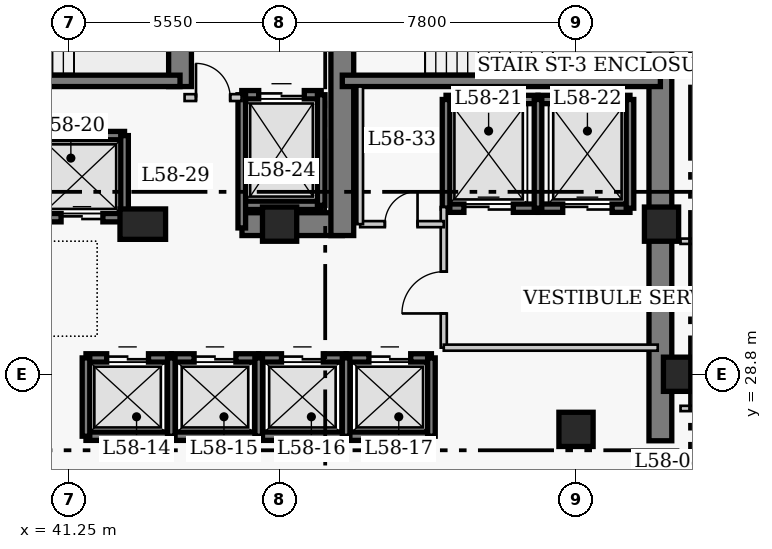
"""IFC4 building model, lengths in metres.
Left out: names, types, materials, properties, quantities, classifications, styles, units other than length and angle.
Written with IfcOpenShell. Run it as: python <this file> out.ifc"""

import sys

from ifc_helpers import new_model, si_unit, direction, frame, frame_2d, origin, origin_2d, place, context, subcontext, project, spatial, rectangle, extrude, element, fill, save


model = new_model("IFC4")
c1 = context("Model", 3, precision=1e-05, world=origin(), true_north=direction((0.0, 1.0)))
c2 = subcontext(c1, "Body", "Model", "MODEL_VIEW")
j1 = project(units=[si_unit("LENGTHUNIT", "METRE"), si_unit("PLANEANGLEUNIT", "RADIAN")], contexts=[c1])
p1 = place(None, origin())
s1 = spatial("IfcSite", under=j1, at=p1, CompositionType="ELEMENT")
p2 = place(p1, origin())
s2 = spatial("IfcBuilding", under=s1, at=p2, CompositionType="ELEMENT")
p3 = place(p2, frame((0.0, 0.0, 231.9)))
s3 = spatial("IfcBuildingStorey", under=s2, at=p3, CompositionType="ELEMENT", Elevation=231.9)
p4 = place(p3, frame((56.82, 27.05, 0.0), z_axis=(0.0, 0.0, 1.0), x_axis=(0.0, 1.0, 0.0)))
e1 = element("IfcWall", 1, at=p4, inside=s3, PredefinedType="SHEAR", context=c2, shape_type="SweptSolid", body=[
    extrude(rectangle(XDim=13.57, YDim=0.6, at=frame_2d((6.785, 0.0))), origin(), (0.0, 0.0, 1.0), 4.6),
])
p5 = place(p3, frame((45.81, 32.75, 0.0), z_axis=(0.0, 0.0, 1.0), x_axis=(1.0, 0.0, 0.0)))
e2 = element("IfcWall", 2, at=p5, inside=s3, PredefinedType="SHEAR", context=c2, shape_type="SweptSolid", body=[
    extrude(rectangle(XDim=2.64, YDim=0.6, at=frame_2d((1.32, 0.0))), origin(), (0.0, 0.0, 1.0), 4.6),
])
p6 = place(p3, frame((44.18, 36.37, 0.0), z_axis=(0.0, 0.0, 1.0), x_axis=(0.0, 1.0, 0.0)))
e3 = element("IfcWall", 3, at=p6, inside=s3, PredefinedType="SHEAR", context=c2, shape_type="SweptSolid", body=[
    extrude(rectangle(XDim=3.95, YDim=0.6, at=frame_2d((1.975, 0.0))), origin(), (0.0, 0.0, 1.0), 4.6),
])
p7 = place(p3, frame((48.45, 32.45, 0.0), z_axis=(0.0, 0.0, 1.0), x_axis=(0.0, 1.0, 0.0)))
e4 = element("IfcWall", 4, at=p7, inside=s3, PredefinedType="SHEAR", context=c2, shape_type="SweptSolid", body=[
    extrude(rectangle(XDim=7.87, YDim=0.6, at=frame_2d((3.935, 0.0))), origin(), (0.0, 0.0, 1.0), 4.6),
])
p8 = place(p7, frame((5.75, 0.0, 0.0)))
e5 = element("IfcOpeningElement", 5, at=p8, cuts=e4, PredefinedType="OPENING", context=c2, shape_type="SweptSolid", body=[
    extrude(rectangle(XDim=1.1, YDim=2.15, at=frame_2d((0.55, 1.075))), frame((0.0, 0.31, 0.0), z_axis=(0.0, -1.0, 0.0), x_axis=(1.0, 0.0, 0.0)), (0.0, 0.0, 1.0), 0.62),
])
p9 = place(p3, frame((35.85, 36.52, 0.0), z_axis=(0.0, 0.0, 1.0), x_axis=(1.0, 0.0, 0.0)))
e6 = element("IfcWall", 6, at=p9, inside=s3, PredefinedType="SHEAR", context=c2, shape_type="SweptSolid", body=[
    extrude(rectangle(XDim=8.33, YDim=0.3, at=frame_2d((4.165, 0.0))), origin(), (0.0, 0.0, 1.0), 4.6),
])
p10 = place(p3, frame((48.45, 36.52, 0.0), z_axis=(0.0, 0.0, 1.0), x_axis=(1.0, 0.0, 0.0)))
e7 = element("IfcWall", 7, at=p10, inside=s3, PredefinedType="SHEAR", context=c2, shape_type="SweptSolid", body=[
    extrude(rectangle(XDim=8.37, YDim=0.3, at=frame_2d((4.185, 0.0))), origin(), (0.0, 0.0, 1.0), 4.6),
])
p11 = place(p3, frame((57.35, 28.8, 0.0), z_axis=(0.0, 0.0, 1.0), x_axis=(1.0, 0.0, 0.0)))
e8 = element("IfcColumn", 8, at=p11, inside=s3, PredefinedType="COLUMN", context=c2, shape_type="SweptSolid", body=[
    extrude(rectangle(XDim=0.9, YDim=0.9, at=origin_2d()), origin(), (0.0, 0.0, 1.0), 4.6),
])
p12 = place(p3, frame((43.2, 32.75, 0.0), z_axis=(0.0, 0.0, 1.0), x_axis=(1.0, 0.0, 0.0)))
e9 = element("IfcColumn", 9, at=p12, inside=s3, PredefinedType="COLUMN", context=c2, shape_type="SweptSolid", body=[
    extrude(rectangle(XDim=1.2, YDim=0.8, at=origin_2d()), origin(), (0.0, 0.0, 1.0), 4.6),
])
for number, where, z_axis, x_axis in (
    (10, (46.8, 32.75, 0.0), (0.0, 0.0, 1.0), (1.0, 0.0, 0.0)),
    (11, (54.6, 27.35, 0.0), (0.0, 0.0, 1.0), (1.0, 0.0, 0.0)),
    (12, (56.85, 32.75, 0.0), (0.0, 0.0, 1.0), (1.0, 0.0, 0.0)),
):
    element("IfcColumn", number, at=place(p3, frame(where, z_axis=z_axis, x_axis=x_axis)), inside=s3, PredefinedType="COLUMN", context=c2, shape_type="SweptSolid", body=[
        extrude(rectangle(XDim=0.9, YDim=0.9, at=origin_2d()), origin(), (0.0, 0.0, 1.0), 4.6),
    ])
p13 = place(p3, frame((41.705, 29.23, 0.0), z_axis=(0.0, 0.0, 1.0), x_axis=(1.0, 0.0, 0.0)))
e13 = element("IfcWall", 13, at=p13, inside=s3, PredefinedType="SHEAR", context=c2, shape_type="SweptSolid", body=[
    extrude(rectangle(XDim=2.245, YDim=0.22, at=frame_2d((1.123, 0.0))), origin(), (0.0, 0.0, 1.0), 4.6),
])
p14 = place(p13, frame((0.545, 0.0, 0.0)))
e14 = element("IfcOpeningElement", 14, at=p14, cuts=e13, PredefinedType="OPENING", context=c2, shape_type="SweptSolid", body=[
    extrude(rectangle(XDim=1.1, YDim=2.15, at=frame_2d((0.55, 1.075))), frame((0.0, 0.12, 0.0), z_axis=(0.0, -1.0, 0.0), x_axis=(1.0, 0.0, 0.0)), (0.0, 0.0, 1.0), 0.24),
])
p15 = place(p3, frame((41.705, 27.17, 0.0), z_axis=(0.0, 0.0, 1.0), x_axis=(1.0, 0.0, 0.0)))
e15 = element("IfcWall", 15, at=p15, inside=s3, PredefinedType="SHEAR", context=c2, shape_type="SweptSolid", body=[
    extrude(rectangle(XDim=2.245, YDim=0.22, at=frame_2d((1.123, 0.0))), origin(), (0.0, 0.0, 1.0), 4.6),
])
p16 = place(p3, frame((41.705, 27.17, 0.0), z_axis=(0.0, 0.0, 1.0), x_axis=(0.0, 1.0, 0.0)))
e16 = element("IfcWall", 16, at=p16, inside=s3, PredefinedType="SHEAR", context=c2, shape_type="SweptSolid", body=[
    extrude(rectangle(XDim=2.06, YDim=0.2, at=frame_2d((1.03, 0.0))), origin(), (0.0, 0.0, 1.0), 4.6),
])
p17 = place(p3, frame((43.95, 29.23, 0.0), z_axis=(0.0, 0.0, 1.0), x_axis=(1.0, 0.0, 0.0)))
e17 = element("IfcWall", 17, at=p17, inside=s3, PredefinedType="SHEAR", context=c2, shape_type="SweptSolid", body=[
    extrude(rectangle(XDim=2.3, YDim=0.22, at=frame_2d((1.15, 0.0))), origin(), (0.0, 0.0, 1.0), 4.6),
])
p18 = place(p17, frame((0.6, 0.0, 0.0)))
e18 = element("IfcOpeningElement", 18, at=p18, cuts=e17, PredefinedType="OPENING", context=c2, shape_type="SweptSolid", body=[
    extrude(rectangle(XDim=1.1, YDim=2.15, at=frame_2d((0.55, 1.075))), frame((0.0, 0.12, 0.0), z_axis=(0.0, -1.0, 0.0), x_axis=(1.0, 0.0, 0.0)), (0.0, 0.0, 1.0), 0.24),
])
p19 = place(p3, frame((43.95, 27.17, 0.0), z_axis=(0.0, 0.0, 1.0), x_axis=(1.0, 0.0, 0.0)))
e19 = element("IfcWall", 19, at=p19, inside=s3, PredefinedType="SHEAR", context=c2, shape_type="SweptSolid", body=[
    extrude(rectangle(XDim=2.3, YDim=0.22, at=frame_2d((1.15, 0.0))), origin(), (0.0, 0.0, 1.0), 4.6),
])
p20 = place(p3, frame((43.95, 27.17, 0.0), z_axis=(0.0, 0.0, 1.0), x_axis=(0.0, 1.0, 0.0)))
e20 = element("IfcWall", 20, at=p20, inside=s3, PredefinedType="SHEAR", context=c2, shape_type="SweptSolid", body=[
    extrude(rectangle(XDim=2.06, YDim=0.2, at=frame_2d((1.03, 0.0))), origin(), (0.0, 0.0, 1.0), 4.6),
])
p21 = place(p3, frame((46.25, 29.23, 0.0), z_axis=(0.0, 0.0, 1.0), x_axis=(1.0, 0.0, 0.0)))
e21 = element("IfcWall", 21, at=p21, inside=s3, PredefinedType="SHEAR", context=c2, shape_type="SweptSolid", body=[
    extrude(rectangle(XDim=2.3, YDim=0.22, at=frame_2d((1.15, 0.0))), origin(), (0.0, 0.0, 1.0), 4.6),
])
p22 = place(p21, frame((0.6, 0.0, 0.0)))
e22 = element("IfcOpeningElement", 22, at=p22, cuts=e21, PredefinedType="OPENING", context=c2, shape_type="SweptSolid", body=[
    extrude(rectangle(XDim=1.1, YDim=2.15, at=frame_2d((0.55, 1.075))), frame((0.0, 0.12, 0.0), z_axis=(0.0, -1.0, 0.0), x_axis=(1.0, 0.0, 0.0)), (0.0, 0.0, 1.0), 0.24),
])
p23 = place(p3, frame((46.25, 27.17, 0.0), z_axis=(0.0, 0.0, 1.0), x_axis=(1.0, 0.0, 0.0)))
e23 = element("IfcWall", 23, at=p23, inside=s3, PredefinedType="SHEAR", context=c2, shape_type="SweptSolid", body=[
    extrude(rectangle(XDim=2.3, YDim=0.22, at=frame_2d((1.15, 0.0))), origin(), (0.0, 0.0, 1.0), 4.6),
])
p24 = place(p3, frame((46.25, 27.17, 0.0), z_axis=(0.0, 0.0, 1.0), x_axis=(0.0, 1.0, 0.0)))
e24 = element("IfcWall", 24, at=p24, inside=s3, PredefinedType="SHEAR", context=c2, shape_type="SweptSolid", body=[
    extrude(rectangle(XDim=2.06, YDim=0.2, at=frame_2d((1.03, 0.0))), origin(), (0.0, 0.0, 1.0), 4.6),
])
p25 = place(p3, frame((48.55, 29.23, 0.0), z_axis=(0.0, 0.0, 1.0), x_axis=(1.0, 0.0, 0.0)))
e25 = element("IfcWall", 25, at=p25, inside=s3, PredefinedType="SHEAR", context=c2, shape_type="SweptSolid", body=[
    extrude(rectangle(XDim=2.245, YDim=0.22, at=frame_2d((1.123, 0.0))), origin(), (0.0, 0.0, 1.0), 4.6),
])
p26 = place(p25, frame((0.6, 0.0, 0.0)))
e26 = element("IfcOpeningElement", 26, at=p26, cuts=e25, PredefinedType="OPENING", context=c2, shape_type="SweptSolid", body=[
    extrude(rectangle(XDim=1.1, YDim=2.15, at=frame_2d((0.55, 1.075))), frame((0.0, 0.12, 0.0), z_axis=(0.0, -1.0, 0.0), x_axis=(1.0, 0.0, 0.0)), (0.0, 0.0, 1.0), 0.24),
])
p27 = place(p3, frame((48.55, 27.17, 0.0), z_axis=(0.0, 0.0, 1.0), x_axis=(1.0, 0.0, 0.0)))
e27 = element("IfcWall", 27, at=p27, inside=s3, PredefinedType="SHEAR", context=c2, shape_type="SweptSolid", body=[
    extrude(rectangle(XDim=2.245, YDim=0.22, at=frame_2d((1.123, 0.0))), origin(), (0.0, 0.0, 1.0), 4.6),
])
for number, where, z_axis, x_axis in (
    (28, (48.55, 27.17, 0.0), (0.0, 0.0, 1.0), (0.0, 1.0, 0.0)),
    (29, (50.795, 27.17, 0.0), (0.0, 0.0, 1.0), (0.0, 1.0, 0.0)),
):
    element("IfcWall", number, at=place(p3, frame(where, z_axis=z_axis, x_axis=x_axis)), inside=s3, PredefinedType="SHEAR", context=c2, shape_type="SweptSolid", body=[
        extrude(rectangle(XDim=2.06, YDim=0.2, at=frame_2d((1.03, 0.0))), origin(), (0.0, 0.0, 1.0), 4.6),
    ])
p28 = place(p3, frame((40.4, 35.08, 0.0), z_axis=(0.0, 0.0, 1.0), x_axis=(1.0, 0.0, 0.0)))
e30 = element("IfcWall", 30, at=p28, inside=s3, PredefinedType="SHEAR", context=c2, shape_type="SweptSolid", body=[
    extrude(rectangle(XDim=2.32, YDim=0.22, at=frame_2d((1.16, 0.0))), origin(), (0.0, 0.0, 1.0), 4.6),
])
p29 = place(p3, frame((40.4, 32.92, 0.0), z_axis=(0.0, 0.0, 1.0), x_axis=(1.0, 0.0, 0.0)))
e31 = element("IfcWall", 31, at=p29, inside=s3, PredefinedType="SHEAR", context=c2, shape_type="SweptSolid", body=[
    extrude(rectangle(XDim=2.32, YDim=0.22, at=frame_2d((1.16, 0.0))), origin(), (0.0, 0.0, 1.0), 4.6),
])
p30 = place(p29, frame((0.65, 0.0, 0.0)))
e32 = element("IfcOpeningElement", 32, at=p30, cuts=e31, PredefinedType="OPENING", context=c2, shape_type="SweptSolid", body=[
    extrude(rectangle(XDim=1.1, YDim=2.15, at=frame_2d((0.55, 1.075))), frame((0.0, 0.12, 0.0), z_axis=(0.0, -1.0, 0.0), x_axis=(1.0, 0.0, 0.0)), (0.0, 0.0, 1.0), 0.24),
])
p31 = place(p3, frame((42.72, 32.92, 0.0), z_axis=(0.0, 0.0, 1.0), x_axis=(0.0, 1.0, 0.0)))
e33 = element("IfcWall", 33, at=p31, inside=s3, PredefinedType="SHEAR", context=c2, shape_type="SweptSolid", body=[
    extrude(rectangle(XDim=2.16, YDim=0.2, at=frame_2d((1.08, 0.0))), origin(), (0.0, 0.0, 1.0), 4.6),
])
p32 = place(p3, frame((51.18, 36.03, 0.0), z_axis=(0.0, 0.0, 1.0), x_axis=(1.0, 0.0, 0.0)))
e34 = element("IfcWall", 34, at=p32, inside=s3, PredefinedType="SHEAR", context=c2, shape_type="SweptSolid", body=[
    extrude(rectangle(XDim=2.42, YDim=0.22, at=frame_2d((1.21, 0.0))), origin(), (0.0, 0.0, 1.0), 4.6),
])
p33 = place(p3, frame((51.18, 33.17, 0.0), z_axis=(0.0, 0.0, 1.0), x_axis=(1.0, 0.0, 0.0)))
e35 = element("IfcWall", 35, at=p33, inside=s3, PredefinedType="SHEAR", context=c2, shape_type="SweptSolid", body=[
    extrude(rectangle(XDim=2.42, YDim=0.22, at=frame_2d((1.21, 0.0))), origin(), (0.0, 0.0, 1.0), 4.6),
])
p34 = place(p33, frame((0.47, 0.0, 0.0)))
e36 = element("IfcOpeningElement", 36, at=p34, cuts=e35, PredefinedType="OPENING", context=c2, shape_type="SweptSolid", body=[
    extrude(rectangle(XDim=1.3, YDim=2.15, at=frame_2d((0.65, 1.075))), frame((0.0, 0.12, 0.0), z_axis=(0.0, -1.0, 0.0), x_axis=(1.0, 0.0, 0.0)), (0.0, 0.0, 1.0), 0.24),
])
p35 = place(p3, frame((51.18, 33.17, 0.0), z_axis=(0.0, 0.0, 1.0), x_axis=(0.0, 1.0, 0.0)))
e37 = element("IfcWall", 37, at=p35, inside=s3, PredefinedType="SHEAR", context=c2, shape_type="SweptSolid", body=[
    extrude(rectangle(XDim=2.86, YDim=0.2, at=frame_2d((1.43, 0.0))), origin(), (0.0, 0.0, 1.0), 4.6),
])
p36 = place(p3, frame((53.6, 36.03, 0.0), z_axis=(0.0, 0.0, 1.0), x_axis=(1.0, 0.0, 0.0)))
e38 = element("IfcWall", 38, at=p36, inside=s3, PredefinedType="SHEAR", context=c2, shape_type="SweptSolid", body=[
    extrude(rectangle(XDim=2.42, YDim=0.22, at=frame_2d((1.21, 0.0))), origin(), (0.0, 0.0, 1.0), 4.6),
])
p37 = place(p3, frame((53.6, 33.17, 0.0), z_axis=(0.0, 0.0, 1.0), x_axis=(1.0, 0.0, 0.0)))
e39 = element("IfcWall", 39, at=p37, inside=s3, PredefinedType="SHEAR", context=c2, shape_type="SweptSolid", body=[
    extrude(rectangle(XDim=2.42, YDim=0.22, at=frame_2d((1.21, 0.0))), origin(), (0.0, 0.0, 1.0), 4.6),
])
p38 = place(p37, frame((0.65, 0.0, 0.0)))
e40 = element("IfcOpeningElement", 40, at=p38, cuts=e39, PredefinedType="OPENING", context=c2, shape_type="SweptSolid", body=[
    extrude(rectangle(XDim=1.3, YDim=2.15, at=frame_2d((0.65, 1.075))), frame((0.0, 0.12, 0.0), z_axis=(0.0, -1.0, 0.0), x_axis=(1.0, 0.0, 0.0)), (0.0, 0.0, 1.0), 0.24),
])
for number, where, z_axis, x_axis in (
    (41, (53.6, 33.17, 0.0), (0.0, 0.0, 1.0), (0.0, 1.0, 0.0)),
    (42, (56.02, 33.17, 0.0), (0.0, 0.0, 1.0), (0.0, 1.0, 0.0)),
):
    element("IfcWall", number, at=place(p3, frame(where, z_axis=z_axis, x_axis=x_axis)), inside=s3, PredefinedType="SHEAR", context=c2, shape_type="SweptSolid", body=[
        extrude(rectangle(XDim=2.86, YDim=0.2, at=frame_2d((1.43, 0.0))), origin(), (0.0, 0.0, 1.0), 4.6),
    ])
p39 = place(p3, frame((45.805, 36.155, 0.0), z_axis=(0.0, 0.0, 1.0), x_axis=(1.0, 0.0, 0.0)))
e43 = element("IfcWall", 43, at=p39, inside=s3, PredefinedType="SHEAR", context=c2, shape_type="SweptSolid", body=[
    extrude(rectangle(XDim=2.09, YDim=0.22, at=frame_2d((1.045, 0.0))), origin(), (0.0, 0.0, 1.0), 4.6),
])
p40 = place(p39, frame((0.445, 0.0, 0.0)))
e44 = element("IfcOpeningElement", 44, at=p40, cuts=e43, PredefinedType="OPENING", context=c2, shape_type="SweptSolid", body=[
    extrude(rectangle(XDim=1.2, YDim=2.15, at=frame_2d((0.6, 1.075))), frame((0.0, 0.12, 0.0), z_axis=(0.0, -1.0, 0.0), x_axis=(1.0, 0.0, 0.0)), (0.0, 0.0, 1.0), 0.24),
])
p41 = place(p3, frame((45.805, 33.245, 0.0), z_axis=(0.0, 0.0, 1.0), x_axis=(1.0, 0.0, 0.0)))
e45 = element("IfcWall", 45, at=p41, inside=s3, PredefinedType="SHEAR", context=c2, shape_type="SweptSolid", body=[
    extrude(rectangle(XDim=2.09, YDim=0.22, at=frame_2d((1.045, 0.0))), origin(), (0.0, 0.0, 1.0), 4.6),
])
p42 = place(p3, frame((45.805, 32.65, 0.0), z_axis=(0.0, 0.0, 1.0), x_axis=(0.0, 1.0, 0.0)))
e46 = element("IfcWall", 46, at=p42, inside=s3, PredefinedType="SHEAR", context=c2, shape_type="SweptSolid", body=[
    extrude(rectangle(XDim=3.505, YDim=0.2, at=frame_2d((1.752, 0.0))), origin(), (0.0, 0.0, 1.0), 4.6),
])
p43 = place(p3, frame((47.895, 33.245, 0.0), z_axis=(0.0, 0.0, 1.0), x_axis=(0.0, 1.0, 0.0)))
e47 = element("IfcWall", 47, at=p43, inside=s3, PredefinedType="SHEAR", context=c2, shape_type="SweptSolid", body=[
    extrude(rectangle(XDim=2.91, YDim=0.2, at=frame_2d((1.455, 0.0))), origin(), (0.0, 0.0, 1.0), 4.6),
])
p44 = place(p3, frame((44.3, 36.08, 0.0), z_axis=(0.0, 0.0, 1.0), x_axis=(1.0, 0.0, 0.0)))
e48 = element("IfcWall", 48, at=p44, inside=s3, PredefinedType="PARTITIONING", context=c2, shape_type="SweptSolid", body=[
    extrude(rectangle(XDim=1.5, YDim=0.18, at=frame_2d((0.75, 0.0))), origin(), (0.0, 0.0, 1.0), 4.35),
])
p45 = place(p44, frame((0.3, 0.0, 0.0)))
e49 = element("IfcOpeningElement", 49, at=p45, cuts=e48, PredefinedType="OPENING", context=c2, shape_type="SweptSolid", body=[
    extrude(rectangle(XDim=0.9, YDim=2.15, at=frame_2d((0.45, 1.075))), frame((0.0, 0.1, 0.0), z_axis=(0.0, -1.0, 0.0), x_axis=(1.0, 0.0, 0.0)), (0.0, 0.0, 1.0), 0.2),
])
p46 = place(p3, frame((51.12, 29.5, 0.0), z_axis=(0.0, 0.0, 1.0), x_axis=(0.0, 1.0, 0.0)))
e50 = element("IfcWall", 50, at=p46, inside=s3, PredefinedType="PARTITIONING", context=c2, shape_type="SweptSolid", body=[
    extrude(rectangle(XDim=3.7, YDim=0.16, at=frame_2d((1.85, 0.0))), origin(), (0.0, 0.0, 1.0), 4.35),
])
p47 = place(p46, frame((0.9, 0.0, 0.0)))
e51 = element("IfcOpeningElement", 51, at=p47, cuts=e50, PredefinedType="OPENING", context=c2, shape_type="SweptSolid", body=[
    extrude(rectangle(XDim=1.1, YDim=2.15, at=frame_2d((0.55, 1.075))), frame((0.0, 0.09, 0.0), z_axis=(0.0, -1.0, 0.0), x_axis=(1.0, 0.0, 0.0)), (0.0, 0.0, 1.0), 0.18),
])
p48 = place(p3, frame((51.12, 29.5, 0.0), z_axis=(0.0, 0.0, 1.0), x_axis=(1.0, 0.0, 0.0)))
e52 = element("IfcWall", 52, at=p48, inside=s3, PredefinedType="PARTITIONING", context=c2, shape_type="SweptSolid", body=[
    extrude(rectangle(XDim=5.63, YDim=0.16, at=frame_2d((2.815, 0.0))), origin(), (0.0, 0.0, 1.0), 4.35),
])
p49 = place(p3, frame((48.92, 32.75, 0.0), z_axis=(0.0, 0.0, 1.0), x_axis=(1.0, 0.0, 0.0)))
e53 = element("IfcWall", 53, at=p49, inside=s3, PredefinedType="PARTITIONING", context=c2, shape_type="SweptSolid", body=[
    extrude(rectangle(XDim=2.2, YDim=0.16, at=frame_2d((1.1, 0.0))), origin(), (0.0, 0.0, 1.0), 4.35),
])
p50 = place(p49, frame((0.65, 0.0, 0.0)))
e54 = element("IfcOpeningElement", 54, at=p50, cuts=e53, PredefinedType="OPENING", context=c2, shape_type="SweptSolid", body=[
    extrude(rectangle(XDim=0.86, YDim=2.05, at=frame_2d((0.43, 1.025))), frame((0.0, 0.09, 0.0), z_axis=(0.0, -1.0, 0.0), x_axis=(1.0, 0.0, 0.0)), (0.0, 0.0, 1.0), 0.18),
])
p51 = place(p3, frame((48.92, 32.75, 0.0), z_axis=(0.0, 0.0, 1.0), x_axis=(0.0, 1.0, 0.0)))
e55 = element("IfcWall", 55, at=p51, inside=s3, PredefinedType="PARTITIONING", context=c2, shape_type="SweptSolid", body=[
    extrude(rectangle(XDim=3.62, YDim=0.15, at=frame_2d((1.81, 0.0))), origin(), (0.0, 0.0, 1.0), 4.35),
])
p52 = place(p3, frame((57.35, 27.9, 0.0), z_axis=(0.0, 0.0, 1.0), x_axis=(1.0, 0.0, 0.0)))
e56 = element("IfcWall", 56, at=p52, inside=s3, PredefinedType="PLUMBINGWALL", context=c2, shape_type="SweptSolid", body=[
    extrude(rectangle(XDim=3.23, YDim=0.14, at=frame_2d((1.615, 0.0))), origin(), (0.0, 0.0, 1.0), 4.35),
])
p53 = place(p52, frame((1.175, 0.0, 0.0)))
e57 = element("IfcOpeningElement", 57, at=p53, cuts=e56, PredefinedType="OPENING", context=c2, shape_type="SweptSolid", body=[
    extrude(rectangle(XDim=0.88, YDim=2.05, at=frame_2d((0.44, 1.025))), frame((0.0, 0.08, 0.0), z_axis=(0.0, -1.0, 0.0), x_axis=(1.0, 0.0, 0.0)), (0.0, 0.0, 1.0), 0.16),
])
p54 = place(p3, frame((57.35, 32.3, 0.0), z_axis=(0.0, 0.0, 1.0), x_axis=(1.0, 0.0, 0.0)))
e58 = element("IfcWall", 58, at=p54, inside=s3, PredefinedType="PLUMBINGWALL", context=c2, shape_type="SweptSolid", body=[
    extrude(rectangle(XDim=3.23, YDim=0.14, at=frame_2d((1.615, 0.0))), origin(), (0.0, 0.0, 1.0), 4.35),
])
p55 = place(p14, origin())
e59 = element("IfcDoor", 59, at=p55, inside=s3, OperationType="DOUBLE_DOOR_SLIDING", PredefinedType="DOOR", context=c2, shape_type="SweptSolid", body=[
    extrude(rectangle(XDim=1.1, YDim=2.15, at=frame_2d((0.55, 1.075))), frame((0.0, 0.025, 0.0), z_axis=(0.0, -1.0, 0.0), x_axis=(1.0, 0.0, 0.0)), (0.0, 0.0, 1.0), 0.05),
])
fill(e14, e59)
p56 = place(p18, origin())
e60 = element("IfcDoor", 60, at=p56, inside=s3, OperationType="DOUBLE_DOOR_SLIDING", PredefinedType="DOOR", context=c2, shape_type="SweptSolid", body=[
    extrude(rectangle(XDim=1.1, YDim=2.15, at=frame_2d((0.55, 1.075))), frame((0.0, 0.025, 0.0), z_axis=(0.0, -1.0, 0.0), x_axis=(1.0, 0.0, 0.0)), (0.0, 0.0, 1.0), 0.05),
])
fill(e18, e60)
p57 = place(p22, origin())
e61 = element("IfcDoor", 61, at=p57, inside=s3, OperationType="DOUBLE_DOOR_SLIDING", PredefinedType="DOOR", context=c2, shape_type="SweptSolid", body=[
    extrude(rectangle(XDim=1.1, YDim=2.15, at=frame_2d((0.55, 1.075))), frame((0.0, 0.025, 0.0), z_axis=(0.0, -1.0, 0.0), x_axis=(1.0, 0.0, 0.0)), (0.0, 0.0, 1.0), 0.05),
])
fill(e22, e61)
p58 = place(p26, origin())
e62 = element("IfcDoor", 62, at=p58, inside=s3, OperationType="DOUBLE_DOOR_SLIDING", PredefinedType="DOOR", context=c2, shape_type="SweptSolid", body=[
    extrude(rectangle(XDim=1.1, YDim=2.15, at=frame_2d((0.55, 1.075))), frame((0.0, 0.025, 0.0), z_axis=(0.0, -1.0, 0.0), x_axis=(1.0, 0.0, 0.0)), (0.0, 0.0, 1.0), 0.05),
])
fill(e26, e62)
p59 = place(p30, origin())
e63 = element("IfcDoor", 63, at=p59, inside=s3, OperationType="DOUBLE_DOOR_SLIDING", PredefinedType="DOOR", context=c2, shape_type="SweptSolid", body=[
    extrude(rectangle(XDim=1.1, YDim=2.15, at=frame_2d((0.55, 1.075))), frame((0.0, 0.025, 0.0), z_axis=(0.0, -1.0, 0.0), x_axis=(1.0, 0.0, 0.0)), (0.0, 0.0, 1.0), 0.05),
])
fill(e32, e63)
p60 = place(p34, origin())
e64 = element("IfcDoor", 64, at=p60, inside=s3, OperationType="DOUBLE_DOOR_SLIDING", PredefinedType="DOOR", context=c2, shape_type="SweptSolid", body=[
    extrude(rectangle(XDim=1.3, YDim=2.15, at=frame_2d((0.65, 1.075))), frame((0.0, 0.025, 0.0), z_axis=(0.0, -1.0, 0.0), x_axis=(1.0, 0.0, 0.0)), (0.0, 0.0, 1.0), 0.05),
])
fill(e36, e64)
p61 = place(p38, origin())
e65 = element("IfcDoor", 65, at=p61, inside=s3, OperationType="DOUBLE_DOOR_SLIDING", PredefinedType="DOOR", context=c2, shape_type="SweptSolid", body=[
    extrude(rectangle(XDim=1.3, YDim=2.15, at=frame_2d((0.65, 1.075))), frame((0.0, 0.025, 0.0), z_axis=(0.0, -1.0, 0.0), x_axis=(1.0, 0.0, 0.0)), (0.0, 0.0, 1.0), 0.05),
])
fill(e40, e65)
p62 = place(p40, origin())
e66 = element("IfcDoor", 66, at=p62, inside=s3, OperationType="DOUBLE_DOOR_SLIDING", PredefinedType="DOOR", context=c2, shape_type="SweptSolid", body=[
    extrude(rectangle(XDim=1.2, YDim=2.15, at=frame_2d((0.6, 1.075))), frame((0.0, 0.025, 0.0), z_axis=(0.0, -1.0, 0.0), x_axis=(1.0, 0.0, 0.0)), (0.0, 0.0, 1.0), 0.05),
])
fill(e44, e66)
p63 = place(p45, origin())
e67 = element("IfcDoor", 67, at=p63, inside=s3, OperationType="SINGLE_SWING_LEFT", PredefinedType="DOOR", context=c2, shape_type="SweptSolid", body=[
    extrude(rectangle(XDim=0.9, YDim=2.15, at=frame_2d((0.45, 1.075))), frame((0.0, 0.025, 0.0), z_axis=(0.0, -1.0, 0.0), x_axis=(1.0, 0.0, 0.0)), (0.0, 0.0, 1.0), 0.05),
])
fill(e49, e67)
p64 = place(p47, origin())
e68 = element("IfcDoor", 68, at=p64, inside=s3, OperationType="SINGLE_SWING_LEFT", PredefinedType="DOOR", context=c2, shape_type="SweptSolid", body=[
    extrude(rectangle(XDim=1.1, YDim=2.15, at=frame_2d((0.55, 1.075))), frame((0.0, 0.025, 0.0), z_axis=(0.0, -1.0, 0.0), x_axis=(1.0, 0.0, 0.0)), (0.0, 0.0, 1.0), 0.05),
])
fill(e51, e68)
p65 = place(p50, origin())
e69 = element("IfcDoor", 69, at=p65, inside=s3, OperationType="SINGLE_SWING_RIGHT", PredefinedType="DOOR", context=c2, shape_type="SweptSolid", body=[
    extrude(rectangle(XDim=0.86, YDim=2.05, at=frame_2d((0.43, 1.025))), frame((0.0, 0.025, 0.0), z_axis=(0.0, -1.0, 0.0), x_axis=(1.0, 0.0, 0.0)), (0.0, 0.0, 1.0), 0.05),
])
fill(e54, e69)
save(model, sys.argv[1])
